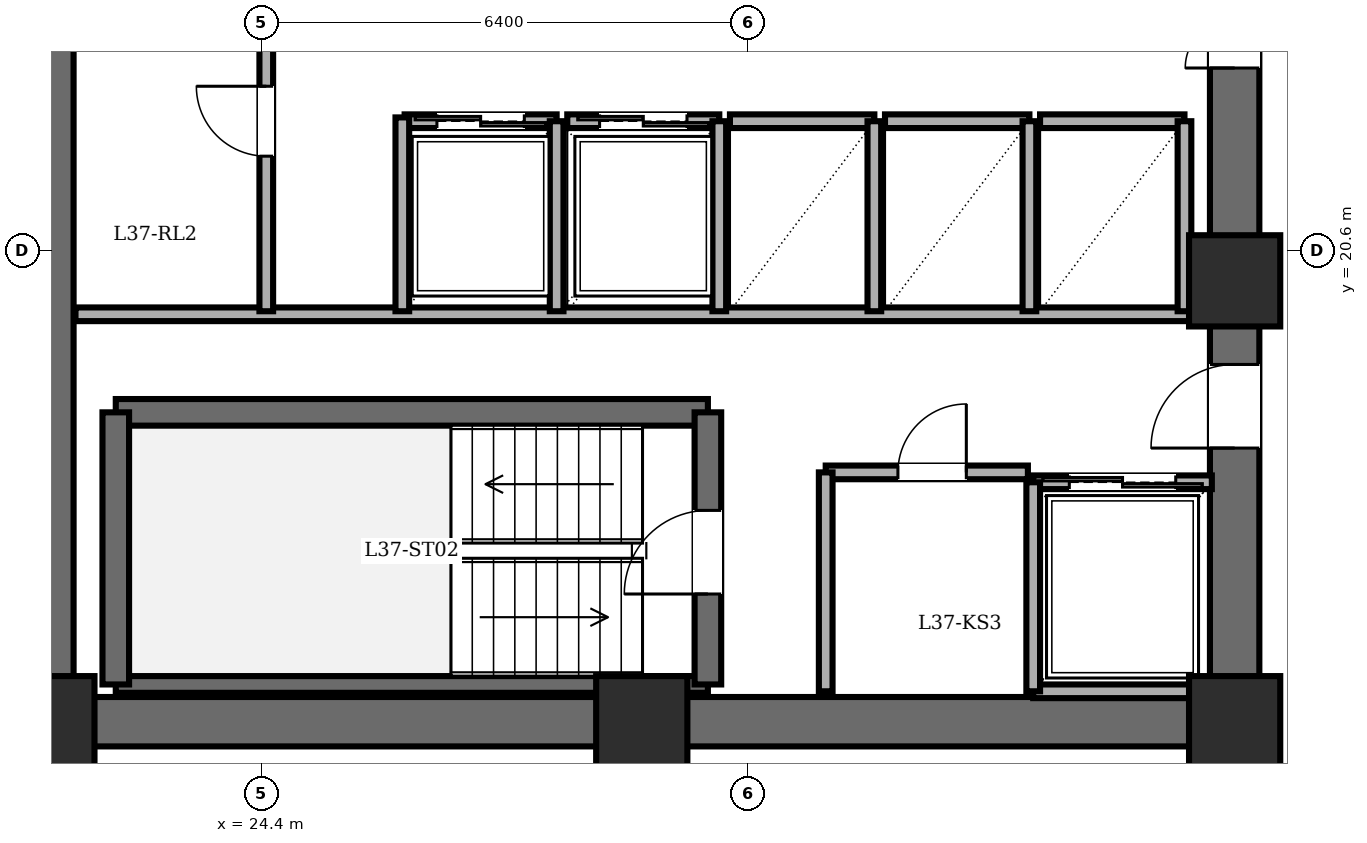
"""IFC4 building model, lengths in metres.
Left out: names, types, materials, properties, quantities, classifications, styles, units other than length and angle.
Written with IfcOpenShell. Run it as: python <this file> out.ifc"""

import sys

from ifc_helpers import new_model, si_unit, direction, frame, frame_2d, origin, origin_2d, place, context, subcontext, project, spatial, rectangle, extrude, element, fill, save


model = new_model("IFC4")
c1 = context("Model", 3, precision=1e-05, world=origin(), true_north=direction((0.0, 1.0)))
c2 = subcontext(c1, "Body", "Model", "MODEL_VIEW")
j1 = project(units=[si_unit("LENGTHUNIT", "METRE"), si_unit("PLANEANGLEUNIT", "RADIAN")], contexts=[c1])
p1 = place(None, origin())
s1 = spatial("IfcSite", under=j1, at=p1, CompositionType="ELEMENT")
p2 = place(p1, origin())
s2 = spatial("IfcBuilding", under=s1, at=p2, CompositionType="ELEMENT")
p3 = place(p2, frame((0.0, 0.0, 143.8)))
s3 = spatial("IfcBuildingStorey", under=s2, at=p3, CompositionType="ELEMENT", Elevation=143.8)
for number, where, z_axis, x_axis in (
    (1, (21.6, 14.4, 0.0), (0.0, 0.0, 1.0), (1.0, 0.0, 0.0)),
    (2, (29.4, 14.4, 0.0), (0.0, 0.0, 1.0), (1.0, 0.0, 0.0)),
    (3, (37.2, 14.4, 0.0), (0.0, 0.0, 1.0), (1.0, 0.0, 0.0)),
    (4, (37.2, 20.2, 0.0), (0.0, 0.0, 1.0), (1.0, 0.0, 0.0)),
):
    element("IfcColumn", number, at=place(p3, frame(where, z_axis=z_axis, x_axis=x_axis)), inside=s3, PredefinedType="COLUMN", context=c2, shape_type="SweptSolid", body=[
        extrude(rectangle(XDim=1.2, YDim=1.2, at=origin_2d()), origin(), (0.0, 0.0, 1.0), 3.6),
    ])
p4 = place(p3, frame((21.6, 14.4, 0.0), z_axis=(0.0, 0.0, 1.0), x_axis=(0.0, 1.0, 0.0)))
e5 = element("IfcWall", 5, at=p4, inside=s3, PredefinedType="SHEAR", context=c2, shape_type="SweptSolid", body=[
    extrude(rectangle(XDim=19.2, YDim=0.65, at=frame_2d((9.6, 0.0))), origin(), (0.0, 0.0, 1.0), 3.4),
])
p5 = place(p3, frame((37.2, 14.4, 0.0), z_axis=(0.0, 0.0, 1.0), x_axis=(-1.0, 0.0, 0.0)))
e6 = element("IfcWall", 6, at=p5, inside=s3, PredefinedType="SHEAR", context=c2, shape_type="SweptSolid", body=[
    extrude(rectangle(XDim=15.6, YDim=0.65, at=frame_2d((7.8, 0.0))), origin(), (0.0, 0.0, 1.0), 3.4),
])
p6 = place(p3, frame((37.2, 14.4, 0.0), z_axis=(0.0, 0.0, 1.0), x_axis=(0.0, 1.0, 0.0)))
e7 = element("IfcWall", 7, at=p6, inside=s3, PredefinedType="SHEAR", context=c2, shape_type="SweptSolid", body=[
    extrude(rectangle(XDim=19.2, YDim=0.65, at=frame_2d((9.6, 0.0))), origin(), (0.0, 0.0, 1.0), 3.4),
])
p7 = place(p6, frame((15.8, 0.0, 0.0)))
e8 = element("IfcOpeningElement", 8, at=p7, cuts=e7, PredefinedType="OPENING", context=c2, shape_type="SweptSolid", body=[
    extrude(rectangle(XDim=1.15, YDim=2.15, at=frame_2d((0.575, 1.075))), frame((0.0, 0.335, 0.0), z_axis=(0.0, -1.0, 0.0), x_axis=(1.0, 0.0, 0.0)), (0.0, 0.0, 1.0), 0.67),
])
p8 = place(p6, frame((3.6, 0.0, 0.0)))
e9 = element("IfcOpeningElement", 9, at=p8, cuts=e7, PredefinedType="OPENING", context=c2, shape_type="SweptSolid", body=[
    extrude(rectangle(XDim=1.1, YDim=2.15, at=frame_2d((0.55, 1.075))), frame((0.0, 0.335, 0.0), z_axis=(0.0, -1.0, 0.0), x_axis=(1.0, 0.0, 0.0)), (0.0, 0.0, 1.0), 0.67),
])
p9 = place(p6, frame((8.6, 0.0, 0.0)))
e10 = element("IfcOpeningElement", 10, at=p9, cuts=e7, PredefinedType="OPENING", context=c2, shape_type="SweptSolid", body=[
    extrude(rectangle(XDim=1.3, YDim=2.2, at=frame_2d((0.65, 1.1))), frame((0.0, 0.335, 0.0), z_axis=(0.0, -1.0, 0.0), x_axis=(1.0, 0.0, 0.0)), (0.0, 0.0, 1.0), 0.67),
])
p10 = place(p3, frame((22.48, 18.47, 0.0), z_axis=(0.0, 0.0, 1.0), x_axis=(1.0, 0.0, 0.0)))
e11 = element("IfcWall", 11, at=p10, inside=s3, PredefinedType="SOLIDWALL", context=c2, shape_type="SweptSolid", body=[
    extrude(rectangle(XDim=7.79, YDim=0.35, at=frame_2d((3.895, 0.0))), origin(), (0.0, 0.0, 1.0), 3.4),
])
p11 = place(p3, frame((22.48, 14.89, 0.0), z_axis=(0.0, 0.0, 1.0), x_axis=(1.0, 0.0, 0.0)))
e12 = element("IfcWall", 12, at=p11, inside=s3, PredefinedType="PARTITIONING", context=c2, shape_type="SweptSolid", body=[
    extrude(rectangle(XDim=7.79, YDim=0.22, at=frame_2d((3.895, 0.0))), origin(), (0.0, 0.0, 1.0), 3.4),
])
p12 = place(p3, frame((22.48, 14.89, 0.0), z_axis=(0.0, 0.0, 1.0), x_axis=(0.0, 1.0, 0.0)))
e13 = element("IfcWall", 13, at=p12, inside=s3, PredefinedType="SOLIDWALL", context=c2, shape_type="SweptSolid", body=[
    extrude(rectangle(XDim=3.58, YDim=0.35, at=frame_2d((1.79, 0.0))), origin(), (0.0, 0.0, 1.0), 3.4),
])
p13 = place(p3, frame((30.27, 14.89, 0.0), z_axis=(0.0, 0.0, 1.0), x_axis=(0.0, 1.0, 0.0)))
e14 = element("IfcWall", 14, at=p13, inside=s3, PredefinedType="SOLIDWALL", context=c2, shape_type="SweptSolid", body=[
    extrude(rectangle(XDim=3.58, YDim=0.35, at=frame_2d((1.79, 0.0))), origin(), (0.0, 0.0, 1.0), 3.4),
])
p14 = place(p13, frame((1.19, 0.0, 0.0)))
e15 = element("IfcOpeningElement", 15, at=p14, cuts=e14, PredefinedType="OPENING", context=c2, shape_type="SweptSolid", body=[
    extrude(rectangle(XDim=1.1, YDim=2.15, at=frame_2d((0.55, 1.075))), frame((0.0, 0.185, 0.0), z_axis=(0.0, -1.0, 0.0), x_axis=(1.0, 0.0, 0.0)), (0.0, 0.0, 1.0), 0.37),
])
p15 = place(p3, frame((21.95, 19.76, 0.0), z_axis=(0.0, 0.0, 1.0), x_axis=(1.0, 0.0, 0.0)))
e16 = element("IfcWall", 16, at=p15, inside=s3, PredefinedType="PARTITIONING", context=c2, shape_type="SweptSolid", body=[
    extrude(rectangle(XDim=14.87, YDim=0.18, at=frame_2d((7.435, 0.0))), origin(), (0.0, 0.0, 1.0), 3.4),
])
p16 = place(p3, frame((31.82, 17.68, 0.0), z_axis=(0.0, 0.0, 1.0), x_axis=(1.0, 0.0, 0.0)))
e17 = element("IfcWall", 17, at=p16, inside=s3, PredefinedType="PARTITIONING", context=c2, shape_type="SweptSolid", body=[
    extrude(rectangle(XDim=2.66, YDim=0.18, at=frame_2d((1.33, 0.0))), origin(), (0.0, 0.0, 1.0), 3.4),
])
p17 = place(p16, frame((0.95, 0.0, 0.0)))
e18 = element("IfcOpeningElement", 18, at=p17, cuts=e17, PredefinedType="OPENING", context=c2, shape_type="SweptSolid", body=[
    extrude(rectangle(XDim=0.9, YDim=2.05, at=frame_2d((0.45, 1.025))), frame((0.0, 0.1, 0.0), z_axis=(0.0, -1.0, 0.0), x_axis=(1.0, 0.0, 0.0)), (0.0, 0.0, 1.0), 0.2),
])
p18 = place(p3, frame((31.82, 14.8, 0.0), z_axis=(0.0, 0.0, 1.0), x_axis=(0.0, 1.0, 0.0)))
e19 = element("IfcWall", 19, at=p18, inside=s3, PredefinedType="PARTITIONING", context=c2, shape_type="SweptSolid", body=[
    extrude(rectangle(XDim=2.88, YDim=0.18, at=frame_2d((1.44, 0.0))), origin(), (0.0, 0.0, 1.0), 3.4),
])
p19 = place(p3, frame((34.55, 17.55, 0.0), z_axis=(0.0, 0.0, 1.0), x_axis=(1.0, 0.0, 0.0)))
e20 = element("IfcWall", 20, at=p19, inside=s3, PredefinedType="PARTITIONING", context=c2, shape_type="SweptSolid", body=[
    extrude(rectangle(XDim=2.35, YDim=0.18, at=frame_2d((1.175, 0.0))), origin(), (0.0, 0.0, 1.0), 3.4),
])
p20 = place(p19, frame((0.475, 0.0, 0.0)))
e21 = element("IfcOpeningElement", 21, at=p20, cuts=e20, PredefinedType="OPENING", context=c2, shape_type="SweptSolid", body=[
    extrude(rectangle(XDim=1.4, YDim=2.3, at=frame_2d((0.7, 1.15))), frame((0.0, 0.1, 0.0), z_axis=(0.0, -1.0, 0.0), x_axis=(1.0, 0.0, 0.0)), (0.0, 0.0, 1.0), 0.2),
])
p21 = place(p3, frame((36.9, 14.8, 0.0), z_axis=(0.0, 0.0, 1.0), x_axis=(-1.0, 0.0, 0.0)))
e22 = element("IfcWall", 22, at=p21, inside=s3, PredefinedType="PARTITIONING", context=c2, shape_type="SweptSolid", body=[
    extrude(rectangle(XDim=2.35, YDim=0.18, at=frame_2d((1.175, 0.0))), origin(), (0.0, 0.0, 1.0), 3.4),
])
p22 = place(p3, frame((34.55, 17.55, 0.0), z_axis=(0.0, 0.0, 1.0), x_axis=(0.0, -1.0, 0.0)))
e23 = element("IfcWall", 23, at=p22, inside=s3, PredefinedType="PARTITIONING", context=c2, shape_type="SweptSolid", body=[
    extrude(rectangle(XDim=2.75, YDim=0.18, at=frame_2d((1.375, 0.0))), origin(), (0.0, 0.0, 1.0), 3.4),
])
p23 = place(p3, frame((26.28, 22.3, 0.0), z_axis=(0.0, 0.0, 1.0), x_axis=(1.0, 0.0, 0.0)))
e24 = element("IfcWall", 24, at=p23, inside=s3, PredefinedType="PARTITIONING", context=c2, shape_type="SweptSolid", body=[
    extrude(rectangle(XDim=2.0, YDim=0.18, at=frame_2d((1.0, 0.0))), origin(), (0.0, 0.0, 1.0), 3.4),
])
p24 = place(p23, frame((0.425, 0.0, 0.0)))
e25 = element("IfcOpeningElement", 25, at=p24, cuts=e24, PredefinedType="OPENING", context=c2, shape_type="SweptSolid", body=[
    extrude(rectangle(XDim=1.15, YDim=2.2, at=frame_2d((0.575, 1.1))), frame((0.0, 0.1, 0.0), z_axis=(0.0, -1.0, 0.0), x_axis=(1.0, 0.0, 0.0)), (0.0, 0.0, 1.0), 0.2),
])
p25 = place(p3, frame((28.28, 19.8, 0.0), z_axis=(0.0, 0.0, 1.0), x_axis=(0.0, 1.0, 0.0)))
e26 = element("IfcWall", 26, at=p25, inside=s3, PredefinedType="PARTITIONING", context=c2, shape_type="SweptSolid", body=[
    extrude(rectangle(XDim=2.5, YDim=0.18, at=frame_2d((1.25, 0.0))), origin(), (0.0, 0.0, 1.0), 3.4),
])
p26 = place(p3, frame((28.42, 22.3, 0.0), z_axis=(0.0, 0.0, 1.0), x_axis=(1.0, 0.0, 0.0)))
e27 = element("IfcWall", 27, at=p26, inside=s3, PredefinedType="PARTITIONING", context=c2, shape_type="SweptSolid", body=[
    extrude(rectangle(XDim=2.0, YDim=0.18, at=frame_2d((1.0, 0.0))), origin(), (0.0, 0.0, 1.0), 3.4),
])
p27 = place(p26, frame((0.425, 0.0, 0.0)))
e28 = element("IfcOpeningElement", 28, at=p27, cuts=e27, PredefinedType="OPENING", context=c2, shape_type="SweptSolid", body=[
    extrude(rectangle(XDim=1.15, YDim=2.2, at=frame_2d((0.575, 1.1))), frame((0.0, 0.1, 0.0), z_axis=(0.0, -1.0, 0.0), x_axis=(1.0, 0.0, 0.0)), (0.0, 0.0, 1.0), 0.2),
])
p28 = place(p3, frame((30.42, 19.8, 0.0), z_axis=(0.0, 0.0, 1.0), x_axis=(0.0, 1.0, 0.0)))
e29 = element("IfcWall", 29, at=p28, inside=s3, PredefinedType="PARTITIONING", context=c2, shape_type="SweptSolid", body=[
    extrude(rectangle(XDim=2.5, YDim=0.18, at=frame_2d((1.25, 0.0))), origin(), (0.0, 0.0, 1.0), 3.4),
])
p29 = place(p3, frame((30.56, 22.3, 0.0), z_axis=(0.0, 0.0, 1.0), x_axis=(1.0, 0.0, 0.0)))
e30 = element("IfcWall", 30, at=p29, inside=s3, PredefinedType="PARTITIONING", context=c2, shape_type="SweptSolid", body=[
    extrude(rectangle(XDim=1.9, YDim=0.18, at=frame_2d((0.95, 0.0))), origin(), (0.0, 0.0, 1.0), 3.4),
])
p30 = place(p3, frame((32.46, 19.8, 0.0), z_axis=(0.0, 0.0, 1.0), x_axis=(0.0, 1.0, 0.0)))
e31 = element("IfcWall", 31, at=p30, inside=s3, PredefinedType="PARTITIONING", context=c2, shape_type="SweptSolid", body=[
    extrude(rectangle(XDim=2.5, YDim=0.18, at=frame_2d((1.25, 0.0))), origin(), (0.0, 0.0, 1.0), 3.4),
])
p31 = place(p3, frame((32.6, 22.3, 0.0), z_axis=(0.0, 0.0, 1.0), x_axis=(1.0, 0.0, 0.0)))
e32 = element("IfcWall", 32, at=p31, inside=s3, PredefinedType="PARTITIONING", context=c2, shape_type="SweptSolid", body=[
    extrude(rectangle(XDim=1.9, YDim=0.18, at=frame_2d((0.95, 0.0))), origin(), (0.0, 0.0, 1.0), 3.4),
])
p32 = place(p3, frame((34.5, 19.8, 0.0), z_axis=(0.0, 0.0, 1.0), x_axis=(0.0, 1.0, 0.0)))
e33 = element("IfcWall", 33, at=p32, inside=s3, PredefinedType="PARTITIONING", context=c2, shape_type="SweptSolid", body=[
    extrude(rectangle(XDim=2.5, YDim=0.18, at=frame_2d((1.25, 0.0))), origin(), (0.0, 0.0, 1.0), 3.4),
])
p33 = place(p3, frame((34.64, 22.3, 0.0), z_axis=(0.0, 0.0, 1.0), x_axis=(1.0, 0.0, 0.0)))
e34 = element("IfcWall", 34, at=p33, inside=s3, PredefinedType="PARTITIONING", context=c2, shape_type="SweptSolid", body=[
    extrude(rectangle(XDim=1.9, YDim=0.18, at=frame_2d((0.95, 0.0))), origin(), (0.0, 0.0, 1.0), 3.4),
])
p34 = place(p3, frame((36.54, 19.8, 0.0), z_axis=(0.0, 0.0, 1.0), x_axis=(0.0, 1.0, 0.0)))
e35 = element("IfcWall", 35, at=p34, inside=s3, PredefinedType="PARTITIONING", context=c2, shape_type="SweptSolid", body=[
    extrude(rectangle(XDim=2.5, YDim=0.18, at=frame_2d((1.25, 0.0))), origin(), (0.0, 0.0, 1.0), 3.4),
])
p35 = place(p3, frame((24.46, 19.8, 0.0), z_axis=(0.0, 0.0, 1.0), x_axis=(0.0, 1.0, 0.0)))
e36 = element("IfcWall", 36, at=p35, inside=s3, PredefinedType="PARTITIONING", context=c2, shape_type="SweptSolid", body=[
    extrude(rectangle(XDim=5.0, YDim=0.18, at=frame_2d((2.5, 0.0))), origin(), (0.0, 0.0, 1.0), 3.4),
])
p36 = place(p35, frame((2.04, 0.0, 0.0)))
e37 = element("IfcOpeningElement", 37, at=p36, cuts=e36, PredefinedType="OPENING", context=c2, shape_type="SweptSolid", body=[
    extrude(rectangle(XDim=0.92, YDim=2.1, at=frame_2d((0.46, 1.05))), frame((0.0, 0.1, 0.0), z_axis=(0.0, -1.0, 0.0), x_axis=(1.0, 0.0, 0.0)), (0.0, 0.0, 1.0), 0.2),
])
p37 = place(p3, frame((26.25, 19.8, 0.0), z_axis=(0.0, 0.0, 1.0), x_axis=(0.0, 1.0, 0.0)))
e38 = element("IfcWall", 38, at=p37, inside=s3, PredefinedType="PARTITIONING", context=c2, shape_type="SweptSolid", body=[
    extrude(rectangle(XDim=2.55, YDim=0.18, at=frame_2d((1.275, 0.0))), origin(), (0.0, 0.0, 1.0), 3.4),
])
p38 = place(p14, origin())
e39 = element("IfcDoor", 39, at=p38, inside=s3, OperationType="SINGLE_SWING_LEFT", PredefinedType="DOOR", context=c2, shape_type="SweptSolid", body=[
    extrude(rectangle(XDim=1.1, YDim=2.15, at=frame_2d((0.55, 1.075))), frame((0.0, 0.025, 0.0), z_axis=(0.0, -1.0, 0.0), x_axis=(1.0, 0.0, 0.0)), (0.0, 0.0, 1.0), 0.05),
])
fill(e15, e39)
p39 = place(p8, origin())
e40 = element("IfcDoor", 40, at=p39, inside=s3, OperationType="SINGLE_SWING_LEFT", PredefinedType="DOOR", context=c2, shape_type="SweptSolid", body=[
    extrude(rectangle(XDim=1.1, YDim=2.15, at=frame_2d((0.55, 1.075))), frame((0.0, 0.025, 0.0), z_axis=(0.0, -1.0, 0.0), x_axis=(1.0, 0.0, 0.0)), (0.0, 0.0, 1.0), 0.05),
])
fill(e9, e40)
p40 = place(p17, origin())
e41 = element("IfcDoor", 41, at=p40, inside=s3, OperationType="SINGLE_SWING_RIGHT", PredefinedType="DOOR", context=c2, shape_type="SweptSolid", body=[
    extrude(rectangle(XDim=0.9, YDim=2.05, at=frame_2d((0.45, 1.025))), frame((0.0, 0.025, 0.0), z_axis=(0.0, -1.0, 0.0), x_axis=(1.0, 0.0, 0.0)), (0.0, 0.0, 1.0), 0.05),
])
fill(e18, e41)
p41 = place(p20, origin())
e42 = element("IfcDoor", 42, at=p41, inside=s3, OperationType="DOUBLE_DOOR_SLIDING", PredefinedType="DOOR", context=c2, shape_type="SweptSolid", body=[
    extrude(rectangle(XDim=1.4, YDim=2.3, at=frame_2d((0.7, 1.15))), frame((0.0, 0.025, 0.0), z_axis=(0.0, -1.0, 0.0), x_axis=(1.0, 0.0, 0.0)), (0.0, 0.0, 1.0), 0.05),
])
fill(e21, e42)
p42 = place(p24, origin())
e43 = element("IfcDoor", 43, at=p42, inside=s3, OperationType="DOUBLE_DOOR_SLIDING", PredefinedType="DOOR", context=c2, shape_type="SweptSolid", body=[
    extrude(rectangle(XDim=1.15, YDim=2.2, at=frame_2d((0.575, 1.1))), frame((0.0, 0.025, 0.0), z_axis=(0.0, -1.0, 0.0), x_axis=(1.0, 0.0, 0.0)), (0.0, 0.0, 1.0), 0.05),
])
fill(e25, e43)
p43 = place(p27, origin())
e44 = element("IfcDoor", 44, at=p43, inside=s3, OperationType="DOUBLE_DOOR_SLIDING", PredefinedType="DOOR", context=c2, shape_type="SweptSolid", body=[
    extrude(rectangle(XDim=1.15, YDim=2.2, at=frame_2d((0.575, 1.1))), frame((0.0, 0.025, 0.0), z_axis=(0.0, -1.0, 0.0), x_axis=(1.0, 0.0, 0.0)), (0.0, 0.0, 1.0), 0.05),
])
fill(e28, e44)
p44 = place(p36, origin())
e45 = element("IfcDoor", 45, at=p44, inside=s3, OperationType="SINGLE_SWING_RIGHT", PredefinedType="DOOR", context=c2, shape_type="SweptSolid", body=[
    extrude(rectangle(XDim=0.92, YDim=2.1, at=frame_2d((0.46, 1.05))), frame((0.0, 0.025, 0.0), z_axis=(0.0, -1.0, 0.0), x_axis=(1.0, 0.0, 0.0)), (0.0, 0.0, 1.0), 0.05),
])
fill(e37, e45)
p45 = place(p9, origin())
e46 = element("IfcDoor", 46, at=p45, inside=s3, OperationType="DOUBLE_DOOR_SINGLE_SWING", PredefinedType="DOOR", context=c2, shape_type="SweptSolid", body=[
    extrude(rectangle(XDim=1.3, YDim=2.2, at=frame_2d((0.65, 1.1))), frame((0.0, 0.025, 0.0), z_axis=(0.0, -1.0, 0.0), x_axis=(1.0, 0.0, 0.0)), (0.0, 0.0, 1.0), 0.05),
])
fill(e10, e46)
save(model, sys.argv[1])
